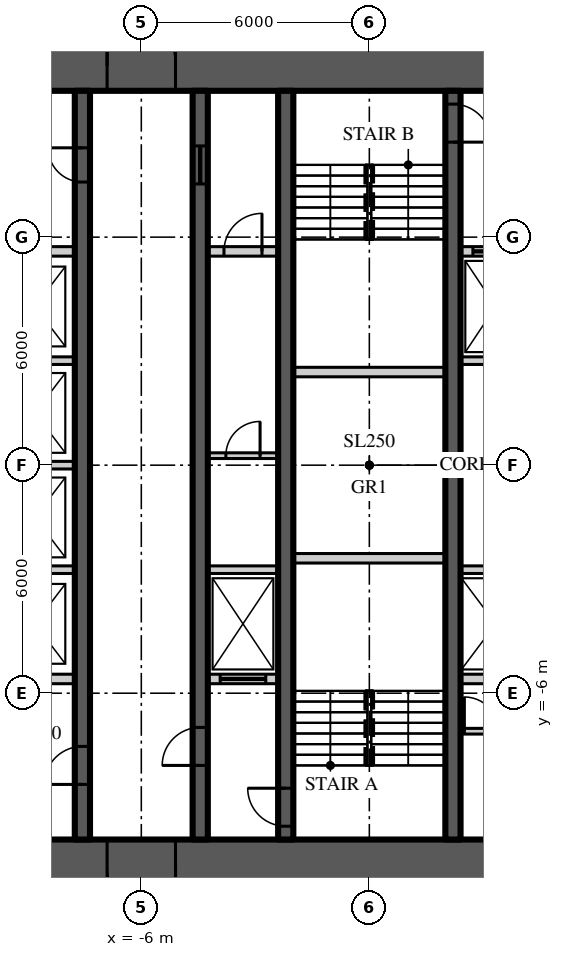
"""IFC4 building model, lengths in metres.
Left out: names, types, materials, properties, quantities, classifications, styles, units other than length and angle.
Written with IfcOpenShell. Run it as: python <this file> out.ifc"""

import sys

from ifc_helpers import new_model, si_unit, direction, frame, frame_2d, origin, place, context, subcontext, project, spatial, rectangle, extrude, element, fill, save


model = new_model("IFC4")
c1 = context("Model", 3, precision=1e-05, world=origin(), true_north=direction((0.0, 1.0)))
c2 = subcontext(c1, "Body", "Model", "MODEL_VIEW")
j1 = project(units=[si_unit("LENGTHUNIT", "METRE"), si_unit("PLANEANGLEUNIT", "RADIAN")], contexts=[c1])
p1 = place(None, origin())
s1 = spatial("IfcSite", under=j1, at=p1, CompositionType="ELEMENT")
p2 = place(p1, origin())
s2 = spatial("IfcBuilding", under=s1, at=p2, CompositionType="ELEMENT")
p3 = place(p2, frame((0.0, 0.0, 23.0)))
s3 = spatial("IfcBuildingStorey", under=s2, at=p3, CompositionType="ELEMENT", Elevation=23.0)
p4 = place(p3, frame((-11.15, 10.5, 0.0), z_axis=(0.0, 0.0, 1.0), x_axis=(1.0, 0.0, 0.0)))
e1 = element("IfcWall", 1, at=p4, inside=s3, PredefinedType="SHEAR", context=c2, shape_type="SweptSolid", body=[
    extrude(rectangle(XDim=22.3, YDim=1.3, at=frame_2d((11.15, 0.0))), origin(), (0.0, 0.0, 1.0), 5.0),
])
p5 = place(p4, frame((4.25, 0.0, 0.0)))
e2 = element("IfcOpeningElement", 2, at=p5, cuts=e1, PredefinedType="OPENING", context=c2, shape_type="SweptSolid", body=[
    extrude(rectangle(XDim=1.8, YDim=2.2, at=frame_2d((0.9, 1.1))), frame((0.0, 0.66, 0.0), z_axis=(0.0, -1.0, 0.0), x_axis=(1.0, 0.0, 0.0)), (0.0, 0.0, 1.0), 1.32),
])
p6 = place(p4, frame((16.25, 0.0, 0.0)))
e3 = element("IfcOpeningElement", 3, at=p6, cuts=e1, PredefinedType="OPENING", context=c2, shape_type="SweptSolid", body=[
    extrude(rectangle(XDim=1.8, YDim=2.2, at=frame_2d((0.9, 1.1))), frame((0.0, 0.66, 0.0), z_axis=(0.0, -1.0, 0.0), x_axis=(1.0, 0.0, 0.0)), (0.0, 0.0, 1.0), 1.32),
])
p7 = place(p3, frame((11.15, -10.5, 0.0), z_axis=(0.0, 0.0, 1.0), x_axis=(-1.0, 0.0, 0.0)))
e4 = element("IfcWall", 4, at=p7, inside=s3, PredefinedType="SHEAR", context=c2, shape_type="SweptSolid", body=[
    extrude(rectangle(XDim=22.3, YDim=1.3, at=frame_2d((11.15, 0.0))), origin(), (0.0, 0.0, 1.0), 5.0),
])
p8 = place(p7, frame((16.25, 0.0, 0.0)))
e5 = element("IfcOpeningElement", 5, at=p8, cuts=e4, PredefinedType="OPENING", context=c2, shape_type="SweptSolid", body=[
    extrude(rectangle(XDim=1.8, YDim=2.2, at=frame_2d((0.9, 1.1))), frame((0.0, 0.66, 0.0), z_axis=(0.0, -1.0, 0.0), x_axis=(1.0, 0.0, 0.0)), (0.0, 0.0, 1.0), 1.32),
])
p9 = place(p7, frame((4.25, 0.0, 0.0)))
e6 = element("IfcOpeningElement", 6, at=p9, cuts=e4, PredefinedType="OPENING", context=c2, shape_type="SweptSolid", body=[
    extrude(rectangle(XDim=1.8, YDim=2.2, at=frame_2d((0.9, 1.1))), frame((0.0, 0.66, 0.0), z_axis=(0.0, -1.0, 0.0), x_axis=(1.0, 0.0, 0.0)), (0.0, 0.0, 1.0), 1.32),
])
p10 = place(p3, frame((-7.55, -9.85, 0.0), z_axis=(0.0, 0.0, 1.0), x_axis=(0.0, 1.0, 0.0)))
e7 = element("IfcWall", 7, at=p10, inside=s3, PredefinedType="SHEAR", context=c2, shape_type="SweptSolid", body=[
    extrude(rectangle(XDim=19.7, YDim=0.4, at=frame_2d((9.85, 0.0))), origin(), (0.0, 0.0, 1.0), 5.0),
])
p11 = place(p10, frame((1.45, 0.0, 0.0)))
e8 = element("IfcOpeningElement", 8, at=p11, cuts=e7, PredefinedType="OPENING", context=c2, shape_type="SweptSolid", body=[
    extrude(rectangle(XDim=1.0, YDim=2.2, at=frame_2d((0.5, 1.1))), frame((0.0, 0.21, 0.0), z_axis=(0.0, -1.0, 0.0), x_axis=(1.0, 0.0, 0.0)), (0.0, 0.0, 1.0), 0.42),
])
p12 = place(p10, frame((17.3, 0.0, 0.0)))
e9 = element("IfcOpeningElement", 9, at=p12, cuts=e7, PredefinedType="OPENING", context=c2, shape_type="SweptSolid", body=[
    extrude(rectangle(XDim=0.9, YDim=2.1, at=frame_2d((0.45, 1.05))), frame((0.0, 0.21, 0.0), z_axis=(0.0, -1.0, 0.0), x_axis=(1.0, 0.0, 0.0)), (0.0, 0.0, 1.0), 0.42),
])
p13 = place(p3, frame((-4.45, -9.85, 0.0), z_axis=(0.0, 0.0, 1.0), x_axis=(0.0, 1.0, 0.0)))
e10 = element("IfcWall", 10, at=p13, inside=s3, PredefinedType="SHEAR", context=c2, shape_type="SweptSolid", body=[
    extrude(rectangle(XDim=19.7, YDim=0.4, at=frame_2d((9.85, 0.0))), origin(), (0.0, 0.0, 1.0), 5.0),
])
p14 = place(p13, frame((1.95, 0.0, 0.0)))
e11 = element("IfcOpeningElement", 11, at=p14, cuts=e10, PredefinedType="OPENING", context=c2, shape_type="SweptSolid", body=[
    extrude(rectangle(XDim=1.0, YDim=2.2, at=frame_2d((0.5, 1.1))), frame((0.0, 0.21, 0.0), z_axis=(0.0, -1.0, 0.0), x_axis=(1.0, 0.0, 0.0)), (0.0, 0.0, 1.0), 0.42),
])
p15 = place(p13, frame((17.25, 0.0, 0.0)))
e12 = element("IfcOpeningElement", 12, at=p15, cuts=e10, PredefinedType="OPENING", context=c2, shape_type="SweptSolid", body=[
    extrude(rectangle(XDim=1.0, YDim=2.1, at=frame_2d((0.5, 1.05))), frame((0.0, 0.21, 0.0), z_axis=(0.0, -1.0, 0.0), x_axis=(1.0, 0.0, 0.0)), (0.0, 0.0, 1.0), 0.42),
])
p16 = place(p3, frame((-2.2, -9.85, 0.0), z_axis=(0.0, 0.0, 1.0), x_axis=(0.0, 1.0, 0.0)))
e13 = element("IfcWall", 13, at=p16, inside=s3, PredefinedType="SHEAR", context=c2, shape_type="SweptSolid", body=[
    extrude(rectangle(XDim=19.7, YDim=0.4, at=frame_2d((9.85, 0.0))), origin(), (0.0, 0.0, 1.0), 5.0),
])
p17 = place(p16, frame((0.35, 0.0, 0.0)))
e14 = element("IfcOpeningElement", 14, at=p17, cuts=e13, PredefinedType="OPENING", context=c2, shape_type="SweptSolid", body=[
    extrude(rectangle(XDim=1.0, YDim=2.2, at=frame_2d((0.5, 1.1))), frame((0.0, 0.21, 0.0), z_axis=(0.0, -1.0, 0.0), x_axis=(1.0, 0.0, 0.0)), (0.0, 0.0, 1.0), 0.42),
])
p18 = place(p3, frame((2.2, 9.85, 0.0), z_axis=(0.0, 0.0, 1.0), x_axis=(0.0, -1.0, 0.0)))
e15 = element("IfcWall", 15, at=p18, inside=s3, PredefinedType="SHEAR", context=c2, shape_type="SweptSolid", body=[
    extrude(rectangle(XDim=19.7, YDim=0.4, at=frame_2d((9.85, 0.0))), origin(), (0.0, 0.0, 1.0), 5.0),
])
p19 = place(p18, frame((0.35, 0.0, 0.0)))
e16 = element("IfcOpeningElement", 16, at=p19, cuts=e15, PredefinedType="OPENING", context=c2, shape_type="SweptSolid", body=[
    extrude(rectangle(XDim=1.0, YDim=2.2, at=frame_2d((0.5, 1.1))), frame((0.0, 0.21, 0.0), z_axis=(0.0, -1.0, 0.0), x_axis=(1.0, 0.0, 0.0)), (0.0, 0.0, 1.0), 0.42),
])
p20 = place(p3, frame((-9.85, 5.625, 0.0), z_axis=(0.0, 0.0, 1.0), x_axis=(1.0, 0.0, 0.0)))
e17 = element("IfcWall", 17, at=p20, inside=s3, PredefinedType="SOLIDWALL", context=c2, shape_type="SweptSolid", body=[
    extrude(rectangle(XDim=2.1, YDim=0.25, at=frame_2d((1.05, 0.0))), origin(), (0.0, 0.0, 1.0), 4.8),
])
p21 = place(p3, frame((-4.25, 5.625, 0.0), z_axis=(0.0, 0.0, 1.0), x_axis=(1.0, 0.0, 0.0)))
e18 = element("IfcWall", 18, at=p21, inside=s3, PredefinedType="SOLIDWALL", context=c2, shape_type="SweptSolid", body=[
    extrude(rectangle(XDim=1.85, YDim=0.25, at=frame_2d((0.925, 0.0))), origin(), (0.0, 0.0, 1.0), 4.8),
])
p22 = place(p21, frame((0.425, 0.0, 0.0)))
e19 = element("IfcOpeningElement", 19, at=p22, cuts=e18, PredefinedType="OPENING", context=c2, shape_type="SweptSolid", body=[
    extrude(rectangle(XDim=1.0, YDim=2.2, at=frame_2d((0.5, 1.1))), frame((0.0, 0.135, 0.0), z_axis=(0.0, -1.0, 0.0), x_axis=(1.0, 0.0, 0.0)), (0.0, 0.0, 1.0), 0.27),
])
p23 = place(p3, frame((2.4, 5.625, 0.0), z_axis=(0.0, 0.0, 1.0), x_axis=(1.0, 0.0, 0.0)))
e20 = element("IfcWall", 20, at=p23, inside=s3, PredefinedType="SOLIDWALL", context=c2, shape_type="SweptSolid", body=[
    extrude(rectangle(XDim=1.85, YDim=0.25, at=frame_2d((0.925, 0.0))), origin(), (0.0, 0.0, 1.0), 4.8),
])
p24 = place(p23, frame((0.325, 0.0, 0.0)))
e21 = element("IfcOpeningElement", 21, at=p24, cuts=e20, PredefinedType="OPENING", context=c2, shape_type="SweptSolid", body=[
    extrude(rectangle(XDim=1.2, YDim=2.2, at=frame_2d((0.6, 1.1))), frame((0.0, 0.135, 0.0), z_axis=(0.0, -1.0, 0.0), x_axis=(1.0, 0.0, 0.0)), (0.0, 0.0, 1.0), 0.27),
])
p25 = place(p3, frame((-9.85, -5.625, 0.0), z_axis=(0.0, 0.0, 1.0), x_axis=(1.0, 0.0, 0.0)))
e22 = element("IfcWall", 22, at=p25, inside=s3, PredefinedType="SOLIDWALL", context=c2, shape_type="SweptSolid", body=[
    extrude(rectangle(XDim=2.1, YDim=0.25, at=frame_2d((1.05, 0.0))), origin(), (0.0, 0.0, 1.0), 4.8),
])
p26 = place(p3, frame((-4.25, -5.625, 0.0), z_axis=(0.0, 0.0, 1.0), x_axis=(1.0, 0.0, 0.0)))
e23 = element("IfcWall", 23, at=p26, inside=s3, PredefinedType="SOLIDWALL", context=c2, shape_type="SweptSolid", body=[
    extrude(rectangle(XDim=1.85, YDim=0.25, at=frame_2d((0.925, 0.0))), origin(), (0.0, 0.0, 1.0), 4.8),
])
p27 = place(p26, frame((0.325, 0.0, 0.0)))
e24 = element("IfcOpeningElement", 24, at=p27, cuts=e23, PredefinedType="OPENING", context=c2, shape_type="SweptSolid", body=[
    extrude(rectangle(XDim=1.2, YDim=2.2, at=frame_2d((0.6, 1.1))), frame((0.0, 0.135, 0.0), z_axis=(0.0, -1.0, 0.0), x_axis=(1.0, 0.0, 0.0)), (0.0, 0.0, 1.0), 0.27),
])
p28 = place(p3, frame((2.4, -5.625, 0.0), z_axis=(0.0, 0.0, 1.0), x_axis=(1.0, 0.0, 0.0)))
e25 = element("IfcWall", 25, at=p28, inside=s3, PredefinedType="SOLIDWALL", context=c2, shape_type="SweptSolid", body=[
    extrude(rectangle(XDim=1.85, YDim=0.25, at=frame_2d((0.925, 0.0))), origin(), (0.0, 0.0, 1.0), 4.8),
])
for number, where, z_axis, x_axis in (
    (26, (-2.0, -2.45, 0.0), (0.0, 0.0, 1.0), (1.0, 0.0, 0.0)),
    (27, (-2.0, 2.45, 0.0), (0.0, 0.0, 1.0), (1.0, 0.0, 0.0)),
):
    element("IfcWall", number, at=place(p3, frame(where, z_axis=z_axis, x_axis=x_axis)), inside=s3, PredefinedType="SOLIDWALL", context=c2, shape_type="SweptSolid", body=[
        extrude(rectangle(XDim=4.0, YDim=0.25, at=frame_2d((2.0, 0.0))), origin(), (0.0, 0.0, 1.0), 4.8),
    ])
p29 = place(p3, frame((-9.85, -2.75, 0.0), z_axis=(0.0, 0.0, 1.0), x_axis=(1.0, 0.0, 0.0)))
e28 = element("IfcWall", 28, at=p29, inside=s3, PredefinedType="SOLIDWALL", context=c2, shape_type="SweptSolid", body=[
    extrude(rectangle(XDim=2.1, YDim=0.2, at=frame_2d((1.05, 0.0))), origin(), (0.0, 0.0, 1.0), 4.8),
])
for number, where, z_axis, x_axis in (
    (29, (-4.25, -2.75, 0.0), (0.0, 0.0, 1.0), (1.0, 0.0, 0.0)),
    (30, (2.4, -2.75, 0.0), (0.0, 0.0, 1.0), (1.0, 0.0, 0.0)),
):
    element("IfcWall", number, at=place(p3, frame(where, z_axis=z_axis, x_axis=x_axis)), inside=s3, PredefinedType="SOLIDWALL", context=c2, shape_type="SweptSolid", body=[
        extrude(rectangle(XDim=1.85, YDim=0.2, at=frame_2d((0.925, 0.0))), origin(), (0.0, 0.0, 1.0), 4.8),
    ])
for number, where, z_axis, x_axis in (
    (31, (-9.85, 0.0, 0.0), (0.0, 0.0, 1.0), (1.0, 0.0, 0.0)),
    (32, (-9.85, 2.75, 0.0), (0.0, 0.0, 1.0), (1.0, 0.0, 0.0)),
):
    element("IfcWall", number, at=place(p3, frame(where, z_axis=z_axis, x_axis=x_axis)), inside=s3, PredefinedType="SOLIDWALL", context=c2, shape_type="SweptSolid", body=[
        extrude(rectangle(XDim=2.1, YDim=0.2, at=frame_2d((1.05, 0.0))), origin(), (0.0, 0.0, 1.0), 4.8),
    ])
p30 = place(p3, frame((2.4, 2.75, 0.0), z_axis=(0.0, 0.0, 1.0), x_axis=(1.0, 0.0, 0.0)))
e33 = element("IfcWall", 33, at=p30, inside=s3, PredefinedType="SOLIDWALL", context=c2, shape_type="SweptSolid", body=[
    extrude(rectangle(XDim=1.85, YDim=0.2, at=frame_2d((0.925, 0.0))), origin(), (0.0, 0.0, 1.0), 4.8),
])
p31 = place(p3, frame((-4.25, 0.25, 0.0), z_axis=(0.0, 0.0, 1.0), x_axis=(1.0, 0.0, 0.0)))
e34 = element("IfcWall", 34, at=p31, inside=s3, PredefinedType="SOLIDWALL", context=c2, shape_type="SweptSolid", body=[
    extrude(rectangle(XDim=1.85, YDim=0.15, at=frame_2d((0.925, 0.0))), origin(), (0.0, 0.0, 1.0), 4.75),
])
p32 = place(p31, frame((0.475, 0.0, 0.0)))
e35 = element("IfcOpeningElement", 35, at=p32, cuts=e34, PredefinedType="OPENING", context=c2, shape_type="SweptSolid", body=[
    extrude(rectangle(XDim=0.9, YDim=2.1, at=frame_2d((0.45, 1.05))), frame((0.0, 0.085, 0.0), z_axis=(0.0, -1.0, 0.0), x_axis=(1.0, 0.0, 0.0)), (0.0, 0.0, 1.0), 0.17),
])
p33 = place(p3, frame((2.4, -7.0, 0.0), z_axis=(0.0, 0.0, 1.0), x_axis=(1.0, 0.0, 0.0)))
e36 = element("IfcWall", 36, at=p33, inside=s3, PredefinedType="SOLIDWALL", context=c2, shape_type="SweptSolid", body=[
    extrude(rectangle(XDim=1.85, YDim=0.15, at=frame_2d((0.925, 0.0))), origin(), (0.0, 0.0, 1.0), 4.75),
])
p34 = place(p33, frame((0.1, 0.0, 0.0)))
e37 = element("IfcOpeningElement", 37, at=p34, cuts=e36, PredefinedType="OPENING", context=c2, shape_type="SweptSolid", body=[
    extrude(rectangle(XDim=0.9, YDim=2.1, at=frame_2d((0.45, 1.05))), frame((0.0, 0.085, 0.0), z_axis=(0.0, -1.0, 0.0), x_axis=(1.0, 0.0, 0.0)), (0.0, 0.0, 1.0), 0.17),
])
p35 = place(p5, origin())
e38 = element("IfcDoor", 38, at=p35, inside=s3, OperationType="DOUBLE_DOOR_DOUBLE_SWING", PredefinedType="DOOR", context=c2, shape_type="SweptSolid", body=[
    extrude(rectangle(XDim=1.8, YDim=2.2, at=frame_2d((0.9, 1.1))), frame((0.0, 0.025, 0.0), z_axis=(0.0, -1.0, 0.0), x_axis=(1.0, 0.0, 0.0)), (0.0, 0.0, 1.0), 0.05),
])
fill(e2, e38)
p36 = place(p8, origin())
e39 = element("IfcDoor", 39, at=p36, inside=s3, OperationType="DOUBLE_DOOR_DOUBLE_SWING", PredefinedType="DOOR", context=c2, shape_type="SweptSolid", body=[
    extrude(rectangle(XDim=1.8, YDim=2.2, at=frame_2d((0.9, 1.1))), frame((0.0, 0.025, 0.0), z_axis=(0.0, -1.0, 0.0), x_axis=(1.0, 0.0, 0.0)), (0.0, 0.0, 1.0), 0.05),
])
fill(e5, e39)
p37 = place(p11, origin())
e40 = element("IfcDoor", 40, at=p37, inside=s3, OperationType="SINGLE_SWING_LEFT", PredefinedType="DOOR", context=c2, shape_type="SweptSolid", body=[
    extrude(rectangle(XDim=1.0, YDim=2.2, at=frame_2d((0.5, 1.1))), frame((0.0, 0.025, 0.0), z_axis=(0.0, -1.0, 0.0), x_axis=(1.0, 0.0, 0.0)), (0.0, 0.0, 1.0), 0.05),
])
fill(e8, e40)
p38 = place(p14, origin())
e41 = element("IfcDoor", 41, at=p38, inside=s3, OperationType="SINGLE_SWING_LEFT", PredefinedType="DOOR", context=c2, shape_type="SweptSolid", body=[
    extrude(rectangle(XDim=1.0, YDim=2.2, at=frame_2d((0.5, 1.1))), frame((0.0, 0.025, 0.0), z_axis=(0.0, -1.0, 0.0), x_axis=(1.0, 0.0, 0.0)), (0.0, 0.0, 1.0), 0.05),
])
fill(e11, e41)
p39 = place(p17, origin())
e42 = element("IfcDoor", 42, at=p39, inside=s3, OperationType="SINGLE_SWING_RIGHT", PredefinedType="DOOR", context=c2, shape_type="SweptSolid", body=[
    extrude(rectangle(XDim=1.0, YDim=2.2, at=frame_2d((0.5, 1.1))), frame((0.0, 0.025, 0.0), z_axis=(0.0, -1.0, 0.0), x_axis=(1.0, 0.0, 0.0)), (0.0, 0.0, 1.0), 0.05),
])
fill(e14, e42)
p40 = place(p19, origin())
e43 = element("IfcDoor", 43, at=p40, inside=s3, OperationType="SINGLE_SWING_RIGHT", PredefinedType="DOOR", context=c2, shape_type="SweptSolid", body=[
    extrude(rectangle(XDim=1.0, YDim=2.2, at=frame_2d((0.5, 1.1))), frame((0.0, 0.025, 0.0), z_axis=(0.0, -1.0, 0.0), x_axis=(1.0, 0.0, 0.0)), (0.0, 0.0, 1.0), 0.05),
])
fill(e16, e43)
p41 = place(p12, origin())
e44 = element("IfcDoor", 44, at=p41, inside=s3, OperationType="SINGLE_SWING_RIGHT", PredefinedType="DOOR", context=c2, shape_type="SweptSolid", body=[
    extrude(rectangle(XDim=0.9, YDim=2.1, at=frame_2d((0.45, 1.05))), frame((0.0, 0.025, 0.0), z_axis=(0.0, -1.0, 0.0), x_axis=(1.0, 0.0, 0.0)), (0.0, 0.0, 1.0), 0.05),
])
fill(e9, e44)
p42 = place(p15, origin())
e45 = element("IfcDoor", 45, at=p42, inside=s3, OperationType="SLIDING_TO_LEFT", PredefinedType="DOOR", context=c2, shape_type="SweptSolid", body=[
    extrude(rectangle(XDim=1.0, YDim=2.1, at=frame_2d((0.5, 1.05))), frame((0.0, 0.025, 0.0), z_axis=(0.0, -1.0, 0.0), x_axis=(1.0, 0.0, 0.0)), (0.0, 0.0, 1.0), 0.05),
])
fill(e12, e45)
p43 = place(p27, origin())
e46 = element("IfcDoor", 46, at=p43, inside=s3, OperationType="SLIDING_TO_LEFT", PredefinedType="DOOR", context=c2, shape_type="SweptSolid", body=[
    extrude(rectangle(XDim=1.2, YDim=2.2, at=frame_2d((0.6, 1.1))), frame((0.0, 0.025, 0.0), z_axis=(0.0, -1.0, 0.0), x_axis=(1.0, 0.0, 0.0)), (0.0, 0.0, 1.0), 0.05),
])
fill(e24, e46)
p44 = place(p24, origin())
e47 = element("IfcDoor", 47, at=p44, inside=s3, OperationType="SLIDING_TO_LEFT", PredefinedType="DOOR", context=c2, shape_type="SweptSolid", body=[
    extrude(rectangle(XDim=1.2, YDim=2.2, at=frame_2d((0.6, 1.1))), frame((0.0, 0.025, 0.0), z_axis=(0.0, -1.0, 0.0), x_axis=(1.0, 0.0, 0.0)), (0.0, 0.0, 1.0), 0.05),
])
fill(e21, e47)
p45 = place(p32, origin())
e48 = element("IfcDoor", 48, at=p45, inside=s3, OperationType="SINGLE_SWING_RIGHT", PredefinedType="DOOR", context=c2, shape_type="SweptSolid", body=[
    extrude(rectangle(XDim=0.9, YDim=2.1, at=frame_2d((0.45, 1.05))), frame((0.0, 0.025, 0.0), z_axis=(0.0, -1.0, 0.0), x_axis=(1.0, 0.0, 0.0)), (0.0, 0.0, 1.0), 0.05),
])
fill(e35, e48)
p46 = place(p22, origin())
e49 = element("IfcDoor", 49, at=p46, inside=s3, OperationType="SINGLE_SWING_RIGHT", PredefinedType="DOOR", context=c2, shape_type="SweptSolid", body=[
    extrude(rectangle(XDim=1.0, YDim=2.2, at=frame_2d((0.5, 1.1))), frame((0.0, 0.025, 0.0), z_axis=(0.0, -1.0, 0.0), x_axis=(1.0, 0.0, 0.0)), (0.0, 0.0, 1.0), 0.05),
])
fill(e19, e49)
p47 = place(p34, origin())
e50 = element("IfcDoor", 50, at=p47, inside=s3, OperationType="SINGLE_SWING_LEFT", PredefinedType="DOOR", context=c2, shape_type="SweptSolid", body=[
    extrude(rectangle(XDim=0.9, YDim=2.1, at=frame_2d((0.45, 1.05))), frame((0.0, 0.025, 0.0), z_axis=(0.0, -1.0, 0.0), x_axis=(1.0, 0.0, 0.0)), (0.0, 0.0, 1.0), 0.05),
])
fill(e37, e50)
save(model, sys.argv[1])
